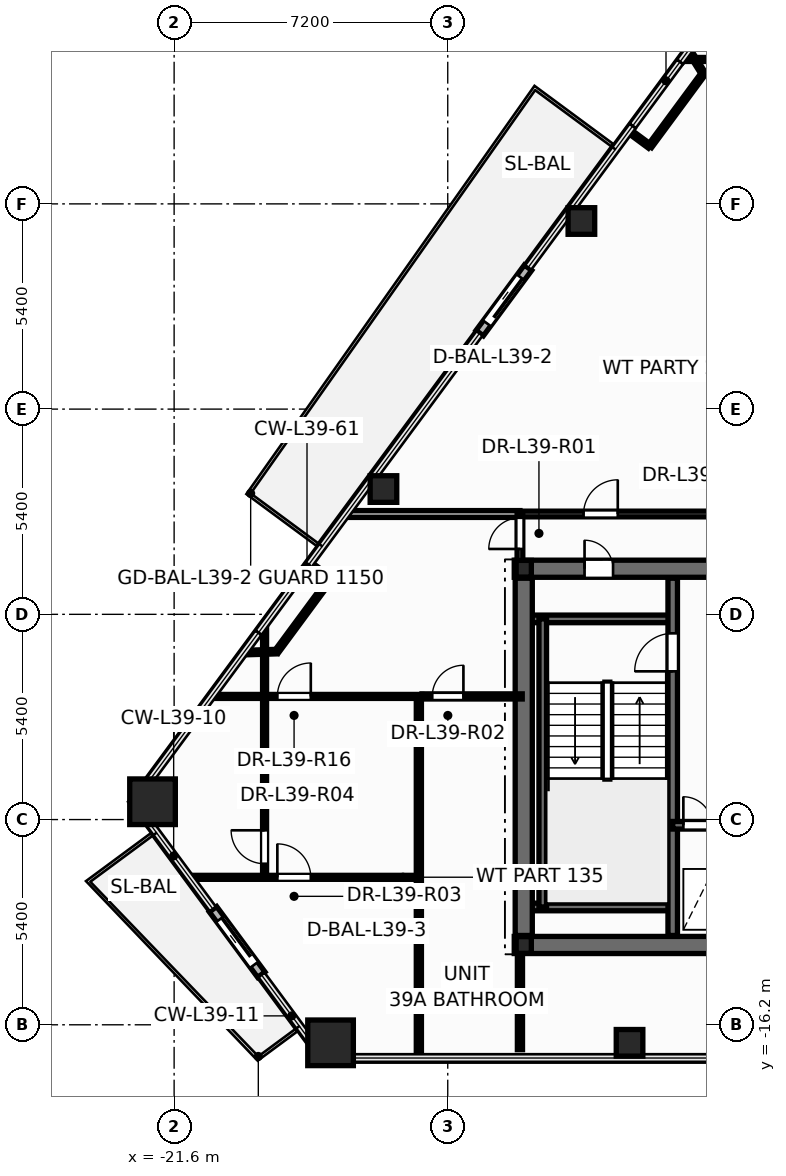
"""IFC4 building model, lengths in metres.
Left out: names, types, materials, properties, quantities, classifications, styles, units other than length and angle.
Written with IfcOpenShell. Run it as: python <this file> out.ifc"""

import sys

from ifc_helpers import new_model, si_unit, direction, frame, frame_2d, origin, origin_2d, place, context, subcontext, project, spatial, rectangle, hollow_rectangle, hollow_circle, i_section, extrude, element, fill, save


model = new_model("IFC4")
c1 = context("Model", 3, precision=1e-05, world=origin(), true_north=direction((0.0, 1.0)))
c2 = subcontext(c1, "Body", "Model", "MODEL_VIEW")
j1 = project(units=[si_unit("LENGTHUNIT", "METRE"), si_unit("PLANEANGLEUNIT", "RADIAN")], contexts=[c1])
p1 = place(None, origin())
s1 = spatial("IfcSite", under=j1, at=p1, CompositionType="ELEMENT")
p2 = place(p1, origin())
s2 = spatial("IfcBuilding", under=s1, at=p2, CompositionType="ELEMENT")
p3 = place(p2, frame((0.0, 0.0, 150.9)))
s3 = spatial("IfcBuildingStorey", under=s2, at=p3, CompositionType="ELEMENT", Elevation=150.9)
for number, where, z_axis, x_axis in (
    (1, (-22.168, -10.331, 0.0), (0.0, 0.0, 1.0), (1.0, 0.0, 0.0)),
    (2, (-17.484, -16.674, 0.0), (0.0, 0.0, 1.0), (1.0, 0.0, 0.0)),
):
    element("IfcColumn", number, at=place(p3, frame(where, z_axis=z_axis, x_axis=x_axis)), inside=s3, PredefinedType="COLUMN", context=c2, shape_type="SweptSolid", body=[
        extrude(hollow_rectangle(XDim=1.2, YDim=1.2, WallThickness=0.055, at=origin_2d()), origin(), (0.0, 0.0, 1.0), 3.6),
    ])
for number, where, z_axis, x_axis in (
    (3, (-9.616, -16.674, 0.0), (0.0, 0.0, 1.0), (1.0, 0.0, 0.0)),
    (4, (-10.883, 4.95, 0.0), (0.0, 0.0, 1.0), (1.0, 0.0, 0.0)),
    (5, (-16.092, -2.103, 0.0), (0.0, 0.0, 1.0), (1.0, 0.0, 0.0)),
):
    element("IfcColumn", number, at=place(p3, frame(where, z_axis=z_axis, x_axis=x_axis)), inside=s3, PredefinedType="COLUMN", context=c2, shape_type="SweptSolid", body=[
        extrude(hollow_circle(Radius=0.35, WallThickness=0.03, at=origin_2d()), origin(), (0.0, 0.0, 1.0), 3.6),
    ])
for number, where, z_axis, x_axis in (
    (6, (-12.4, -14.1, 0.0), (0.0, 0.0, 1.0), (1.0, 0.0, 0.0)),
    (7, (-12.4, -4.2, 0.0), (0.0, 0.0, 1.0), (1.0, 0.0, 0.0)),
):
    element("IfcColumn", number, at=place(p3, frame(where, z_axis=z_axis, x_axis=x_axis)), inside=s3, PredefinedType="COLUMN", context=c2, shape_type="SweptSolid", body=[
        extrude(i_section(OverallWidth=0.4, OverallDepth=0.44, WebThickness=0.028, FlangeThickness=0.04, at=origin_2d()), origin(), (0.0, 0.0, 1.0), 3.6),
    ])
p4 = place(p3, frame((-12.288, 3.721, -0.015), z_axis=(0.0, 0.0, 1.0), x_axis=(-0.593996463284, -0.804467651062, 0.0)))
e8 = element("IfcWall", 8, at=p4, inside=s3, PredefinedType="STANDARD", context=c2, shape_type="SweptSolid", body=[
    extrude(rectangle(XDim=2.14, YDim=0.24, at=frame_2d((1.07, 0.0))), origin(), (0.0, 0.0, 1.0), 2.807),
])
p5 = place(p4, frame((0.32, 0.0, 0.015)))
e9 = element("IfcOpeningElement", 9, at=p5, cuts=e8, PredefinedType="OPENING", context=c2, shape_type="SweptSolid", body=[
    extrude(rectangle(XDim=1.506, YDim=2.204, at=frame_2d((0.75, 1.102))), frame((0.0, 0.13, 0.0), z_axis=(0.0, -1.0, 0.0), x_axis=(1.0, 0.0, 0.0)), (0.0, 0.0, 1.0), 0.26),
])
p6 = place(p3, frame((-20.577, -13.159, -0.015), z_axis=(0.0, 0.0, 1.0), x_axis=(0.59407028248, -0.804413139794, 0.0)))
e10 = element("IfcWall", 10, at=p6, inside=s3, PredefinedType="STANDARD", context=c2, shape_type="SweptSolid", body=[
    extrude(rectangle(XDim=2.14, YDim=0.24, at=frame_2d((1.07, 0.0))), origin(), (0.0, 0.0, 1.0), 2.807),
])
p7 = place(p6, frame((0.32, 0.0, 0.015)))
e11 = element("IfcOpeningElement", 11, at=p7, cuts=e10, PredefinedType="OPENING", context=c2, shape_type="SweptSolid", body=[
    extrude(rectangle(XDim=1.506, YDim=2.204, at=frame_2d((0.75, 1.102))), frame((0.0, 0.13, 0.0), z_axis=(0.0, -1.0, 0.0), x_axis=(1.0, 0.0, 0.0)), (0.0, 0.0, 1.0), 0.26),
])
p8 = place(p3, frame((-12.65, -14.1, 0.0), z_axis=(0.0, 0.0, 1.0), x_axis=(1.0, 0.0, 0.0)))
e12 = element("IfcWall", 12, at=p8, inside=s3, PredefinedType="SHEAR", context=c2, shape_type="SweptSolid", body=[
    extrude(rectangle(XDim=25.3, YDim=0.45, at=frame_2d((12.65, 0.0))), origin(), (0.0, 0.0, 1.0), 3.6),
])
p9 = place(p3, frame((-12.65, -4.2, 0.0), z_axis=(0.0, 0.0, 1.0), x_axis=(1.0, 0.0, 0.0)))
e13 = element("IfcWall", 13, at=p9, inside=s3, PredefinedType="SHEAR", context=c2, shape_type="SweptSolid", body=[
    extrude(rectangle(XDim=25.3, YDim=0.45, at=frame_2d((12.65, 0.0))), origin(), (0.0, 0.0, 1.0), 3.6),
])
p10 = place(p9, frame((1.85, 0.0, 0.0)))
e14 = element("IfcOpeningElement", 14, at=p10, cuts=e13, PredefinedType="OPENING", context=c2, shape_type="SweptSolid", body=[
    extrude(rectangle(XDim=0.756, YDim=2.054, at=frame_2d((0.375, 1.027))), frame((0.0, 0.235, 0.0), z_axis=(0.0, -1.0, 0.0), x_axis=(1.0, 0.0, 0.0)), (0.0, 0.0, 1.0), 0.47),
])
p11 = place(p9, frame((22.65, 0.0, 0.0)))
e15 = element("IfcOpeningElement", 15, at=p11, cuts=e13, PredefinedType="OPENING", context=c2, shape_type="SweptSolid", body=[
    extrude(rectangle(XDim=0.756, YDim=2.054, at=frame_2d((0.375, 1.027))), frame((0.0, 0.235, 0.0), z_axis=(0.0, -1.0, 0.0), x_axis=(1.0, 0.0, 0.0)), (0.0, 0.0, 1.0), 0.47),
])
p12 = place(p9, frame((5.85, 0.0, 0.0)))
e16 = element("IfcOpeningElement", 16, at=p12, cuts=e13, PredefinedType="OPENING", context=c2, shape_type="SweptSolid", body=[
    extrude(rectangle(XDim=1.006, YDim=2.104, at=frame_2d((0.5, 1.052))), frame((0.0, 0.235, 0.0), z_axis=(0.0, -1.0, 0.0), x_axis=(1.0, 0.0, 0.0)), (0.0, 0.0, 1.0), 0.47),
])
p13 = place(p9, frame((10.35, 0.0, 0.0)))
e17 = element("IfcOpeningElement", 17, at=p13, cuts=e13, PredefinedType="OPENING", context=c2, shape_type="SweptSolid", body=[
    extrude(rectangle(XDim=1.406, YDim=2.154, at=frame_2d((0.7, 1.077))), frame((0.0, 0.235, 0.0), z_axis=(0.0, -1.0, 0.0), x_axis=(1.0, 0.0, 0.0)), (0.0, 0.0, 1.0), 0.47),
])
p14 = place(p9, frame((18.45, 0.0, 0.0)))
e18 = element("IfcOpeningElement", 18, at=p14, cuts=e13, PredefinedType="OPENING", context=c2, shape_type="SweptSolid", body=[
    extrude(rectangle(XDim=1.006, YDim=2.104, at=frame_2d((0.5, 1.052))), frame((0.0, 0.235, 0.0), z_axis=(0.0, -1.0, 0.0), x_axis=(1.0, 0.0, 0.0)), (0.0, 0.0, 1.0), 0.47),
])
for number, where, z_axis, x_axis in (
    (19, (-12.35, -5.52, 0.0), (0.0, 0.0, 1.0), (1.0, 0.0, 0.0)),
    (20, (-12.35, -13.1, 0.0), (0.0, 0.0, 1.0), (1.0, 0.0, 0.0)),
):
    element("IfcWall", number, at=place(p3, frame(where, z_axis=z_axis, x_axis=x_axis)), inside=s3, PredefinedType="SOLIDWALL", context=c2, shape_type="SweptSolid", body=[
        extrude(rectangle(XDim=3.87, YDim=0.2, at=frame_2d((1.935, 0.0))), origin(), (0.0, 0.0, 1.0), 3.6),
    ])
p15 = place(p3, frame((-11.9, -13.1, 0.0), z_axis=(0.0, 0.0, 1.0), x_axis=(0.0, 1.0, 0.0)))
e21 = element("IfcWall", 21, at=p15, inside=s3, PredefinedType="SOLIDWALL", context=c2, shape_type="SweptSolid", body=[
    extrude(rectangle(XDim=7.58, YDim=0.2, at=frame_2d((3.79, 0.0))), origin(), (0.0, 0.0, 1.0), 3.6),
])
p16 = place(p3, frame((-8.48, -13.85, 0.0), z_axis=(0.0, 0.0, 1.0), x_axis=(0.0, 1.0, 0.0)))
e22 = element("IfcWall", 22, at=p16, inside=s3, PredefinedType="SHEAR", context=c2, shape_type="SweptSolid", body=[
    extrude(rectangle(XDim=9.4, YDim=0.25, at=frame_2d((4.7, 0.0))), origin(), (0.0, 0.0, 1.0), 3.6),
])
p17 = place(p16, frame((6.95, 0.0, 0.0)))
e23 = element("IfcOpeningElement", 23, at=p17, cuts=e22, PredefinedType="OPENING", context=c2, shape_type="SweptSolid", body=[
    extrude(rectangle(XDim=1.006, YDim=2.104, at=frame_2d((0.5, 1.052))), frame((0.0, 0.135, 0.0), z_axis=(0.0, -1.0, 0.0), x_axis=(1.0, 0.0, 0.0)), (0.0, 0.0, 1.0), 0.27),
])
p18 = place(p3, frame((-8.48, -10.95, 0.0), z_axis=(0.0, 0.0, 1.0), x_axis=(1.0, 0.0, 0.0)))
e24 = element("IfcWall", 24, at=p18, inside=s3, PredefinedType="SOLIDWALL", context=c2, shape_type="SweptSolid", body=[
    extrude(rectangle(XDim=3.36, YDim=0.2, at=frame_2d((1.68, 0.0))), origin(), (0.0, 0.0, 1.0), 3.6),
])
p19 = place(p18, frame((0.28, 0.0, 0.0)))
e25 = element("IfcOpeningElement", 25, at=p19, cuts=e24, PredefinedType="OPENING", context=c2, shape_type="SweptSolid", body=[
    extrude(rectangle(XDim=0.756, YDim=2.054, at=frame_2d((0.375, 1.027))), frame((0.0, 0.11, 0.0), z_axis=(0.0, -1.0, 0.0), x_axis=(1.0, 0.0, 0.0)), (0.0, 0.0, 1.0), 0.22),
])
p20 = place(p18, frame((1.85, 0.0, 0.0)))
e26 = element("IfcOpeningElement", 26, at=p20, cuts=e24, PredefinedType="OPENING", context=c2, shape_type="SweptSolid", body=[
    extrude(rectangle(XDim=1.106, YDim=2.104, at=frame_2d((0.55, 1.052))), frame((0.0, 0.11, 0.0), z_axis=(0.0, -1.0, 0.0), x_axis=(1.0, 0.0, 0.0)), (0.0, 0.0, 1.0), 0.22),
])
p21 = place(p3, frame((-12.4, -13.85, 0.0), z_axis=(0.0, 0.0, 1.0), x_axis=(0.0, 1.0, 0.0)))
e27 = element("IfcWall", 27, at=p21, inside=s3, PredefinedType="SHEAR", context=c2, shape_type="SweptSolid", body=[
    extrude(rectangle(XDim=9.4, YDim=0.45, at=frame_2d((4.7, 0.0))), origin(), (0.0, 0.0, 1.0), 3.6),
])
p22 = place(p3, frame((-19.22, -12.32, 0.0), z_axis=(0.0, 0.0, 1.0), x_axis=(0.0, 1.0, 0.0)))
e28 = element("IfcWall", 28, at=p22, inside=s3, PredefinedType="PARTITIONING", context=c2, shape_type="SweptSolid", body=[
    extrude(rectangle(XDim=6.654, YDim=0.105, at=frame_2d((3.327, 0.0))), origin(), (0.0, 0.0, 1.0), 2.325),
])
p23 = place(p22, frame((0.357, 0.0, 0.0)))
e29 = element("IfcOpeningElement", 29, at=p23, cuts=e28, PredefinedType="OPENING", context=c2, shape_type="SweptSolid", body=[
    extrude(rectangle(XDim=0.886, YDim=2.104, at=frame_2d((0.44, 1.052))), frame((0.0, 0.062, 0.0), z_axis=(0.0, -1.0, 0.0), x_axis=(1.0, 0.0, 0.0)), (0.0, 0.0, 1.0), 0.125),
])
p24 = place(p3, frame((-12.5, -2.76, 0.0), z_axis=(0.0, 0.0, 1.0), x_axis=(1.0, 0.0, 0.0)))
e30 = element("IfcWall", 30, at=p24, inside=s3, PredefinedType="PARTITIONING", context=c2, shape_type="SweptSolid", body=[
    extrude(rectangle(XDim=6.478, YDim=0.15, at=frame_2d((3.239, 0.0))), origin(), (0.0, 0.0, 1.0), 2.325),
])
p25 = place(p24, frame((1.674, 0.0, 0.0)))
e31 = element("IfcOpeningElement", 31, at=p25, cuts=e30, PredefinedType="OPENING", context=c2, shape_type="SweptSolid", body=[
    extrude(rectangle(XDim=0.906, YDim=2.104, at=frame_2d((0.45, 1.052))), frame((0.0, 0.085, 0.0), z_axis=(0.0, -1.0, 0.0), x_axis=(1.0, 0.0, 0.0)), (0.0, 0.0, 1.0), 0.17),
])
p26 = place(p3, frame((-21.197, -12.32, 0.0), z_axis=(0.0, 0.0, 1.0), x_axis=(1.0, 0.0, 0.0)))
e32 = element("IfcWall", 32, at=p26, inside=s3, PredefinedType="PARTITIONING", context=c2, shape_type="SweptSolid", body=[
    extrude(rectangle(XDim=6.037, YDim=0.105, at=frame_2d((3.019, 0.0))), origin(), (0.0, 0.0, 1.0), 2.792),
])
p27 = place(p26, frame((2.313, 0.0, 0.0)))
e33 = element("IfcOpeningElement", 33, at=p27, cuts=e32, PredefinedType="OPENING", context=c2, shape_type="SweptSolid", body=[
    extrude(rectangle(XDim=0.886, YDim=2.104, at=frame_2d((0.44, 1.052))), frame((0.0, 0.062, 0.0), z_axis=(0.0, -1.0, 0.0), x_axis=(1.0, 0.0, 0.0)), (0.0, 0.0, 1.0), 0.125),
])
p28 = place(p3, frame((-20.619, -7.56, 0.0), z_axis=(0.0, 0.0, 1.0), x_axis=(1.0, 0.0, 0.0)))
e34 = element("IfcWall", 34, at=p28, inside=s3, PredefinedType="PARTITIONING", context=c2, shape_type="SweptSolid", body=[
    extrude(rectangle(XDim=5.539, YDim=0.105, at=frame_2d((2.77, 0.0))), origin(), (0.0, 0.0, 1.0), 2.325),
])
p29 = place(p28, frame((1.735, 0.0, 0.0)))
e35 = element("IfcOpeningElement", 35, at=p29, cuts=e34, PredefinedType="OPENING", context=c2, shape_type="SweptSolid", body=[
    extrude(rectangle(XDim=0.886, YDim=2.104, at=frame_2d((0.44, 1.052))), frame((0.0, 0.062, 0.0), z_axis=(0.0, -1.0, 0.0), x_axis=(1.0, 0.0, 0.0)), (0.0, 0.0, 1.0), 0.125),
])
p30 = place(p3, frame((-15.16, -17.074, 0.0), z_axis=(0.0, 0.0, 1.0), x_axis=(0.0, 1.0, 0.0)))
e36 = element("IfcWall", 36, at=p30, inside=s3, PredefinedType="PARTITIONING", context=c2, shape_type="SweptSolid", body=[
    extrude(rectangle(XDim=9.514, YDim=0.135, at=frame_2d((4.757, 0.0))), origin(), (0.0, 0.0, 1.0), 2.792),
])
p31 = place(p3, frame((-17.074, -2.76, 0.0), z_axis=(0.0, 0.0, 1.0), x_axis=(1.0, 0.0, 0.0)))
e37 = element("IfcWall", 37, at=p31, inside=s3, PredefinedType="PARTITIONING", context=c2, shape_type="SweptSolid", body=[
    extrude(rectangle(XDim=4.574, YDim=0.18, at=frame_2d((2.287, 0.0))), origin(), (0.0, 0.0, 1.0), 2.792),
])
p32 = place(p3, frame((-15.078, -7.56, 0.0), z_axis=(0.0, 0.0, 1.0), x_axis=(1.0, 0.0, 0.0)))
e38 = element("IfcWall", 38, at=p32, inside=s3, PredefinedType="PARTITIONING", context=c2, shape_type="SweptSolid", body=[
    extrude(rectangle(XDim=2.638, YDim=0.135, at=frame_2d((1.319, 0.0))), origin(), (0.0, 0.0, 1.0), 2.792),
])
p33 = place(p32, frame((0.271, 0.0, 0.0)))
e39 = element("IfcOpeningElement", 39, at=p33, cuts=e38, PredefinedType="OPENING", context=c2, shape_type="SweptSolid", body=[
    extrude(rectangle(XDim=0.826, YDim=2.104, at=frame_2d((0.41, 1.052))), frame((0.0, 0.078, 0.0), z_axis=(0.0, -1.0, 0.0), x_axis=(1.0, 0.0, 0.0)), (0.0, 0.0, 1.0), 0.155),
])
for number, where, z_axis, x_axis in (
    (40, (-7.671, 8.827, 0.0), (0.0, 0.0, 1.0), (-0.594, -0.804, 0.0)),
    (41, (-17.49, -4.468, 0.0), (0.0, 0.0, 1.0), (-0.594, -0.804, 0.0)),
):
    element("IfcWall", number, at=place(p3, frame(where, z_axis=z_axis, x_axis=x_axis)), inside=s3, PredefinedType="PARTITIONING", context=c2, shape_type="SweptSolid", body=[
        extrude(rectangle(XDim=2.378, YDim=0.12, at=frame_2d((1.189, 0.0))), origin(), (0.0, 0.0, 1.0), 3.35),
    ])
p34 = place(p3, frame((-8.12, 9.2, 0.0), z_axis=(0.0, 0.0, 1.0), x_axis=(1.0, 0.0, 0.0)))
e42 = element("IfcWall", 42, at=p34, inside=s3, PredefinedType="PARTITIONING", context=c2, shape_type="SweptSolid", body=[
    extrude(rectangle(XDim=2.098, YDim=0.105, at=frame_2d((1.049, 0.0))), origin(), (0.0, 0.0, 1.0), 2.792),
])
p35 = place(p3, frame((-12.5, -4.24, 0.0), z_axis=(0.0, 0.0, 1.0), x_axis=(0.0, 1.0, 0.0)))
e43 = element("IfcWall", 43, at=p35, inside=s3, PredefinedType="PARTITIONING", context=c2, shape_type="SweptSolid", body=[
    extrude(rectangle(XDim=1.48, YDim=0.15, at=frame_2d((0.74, 0.0))), origin(), (0.0, 0.0, 1.0), 2.325),
])
p36 = place(p35, frame((0.56, 0.0, 0.0)))
e44 = element("IfcOpeningElement", 44, at=p36, cuts=e43, PredefinedType="OPENING", context=c2, shape_type="SweptSolid", body=[
    extrude(rectangle(XDim=0.826, YDim=2.104, at=frame_2d((0.41, 1.052))), frame((0.0, 0.085, 0.0), z_axis=(0.0, -1.0, 0.0), x_axis=(1.0, 0.0, 0.0)), (0.0, 0.0, 1.0), 0.17),
])
p37 = place(p3, frame((-18.903, -6.381, 0.0), z_axis=(0.0, 0.0, 1.0), x_axis=(-0.999556038353, -0.029794734305, 0.0)))
e45 = element("IfcWall", 45, at=p37, inside=s3, PredefinedType="PARTITIONING", context=c2, shape_type="SweptSolid", body=[
    extrude(rectangle(XDim=0.852, YDim=0.12, at=frame_2d((0.426, 0.0))), origin(), (0.0, 0.0, 1.0), 2.792),
])
p38 = place(p3, frame((-8.054, 9.437, 0.0), z_axis=(0.0, 0.0, 1.0), x_axis=(0.531553111266, -0.847024964156, 0.0)))
e46 = element("IfcWall", 46, at=p38, inside=s3, PredefinedType="PARTITIONING", context=c2, shape_type="SweptSolid", body=[
    extrude(rectangle(XDim=0.72, YDim=0.12, at=frame_2d((0.36, 0.0))), origin(), (0.0, 0.0, 1.0), 2.792),
])
for number, where, z_axis, x_axis in (
    (47, (-9.084, 6.914, 0.0), (0.0, 0.0, 1.0), (-0.804, 0.594, 0.0)),
    (48, (-18.029, -4.07, 0.0), (0.0, 0.0, 1.0), (0.805, -0.594, 0.0)),
):
    element("IfcWall", number, at=place(p3, frame(where, z_axis=z_axis, x_axis=x_axis)), inside=s3, PredefinedType="PARTITIONING", context=c2, shape_type="SweptSolid", body=[
        extrude(rectangle(XDim=0.67, YDim=0.12, at=frame_2d((0.335, 0.0))), origin(), (0.0, 0.0, 1.0), 2.792),
    ])
p39 = place(p3, frame((-12.5, -14.4, 0.0), z_axis=(0.0, 0.0, 1.0), x_axis=(0.0, -1.0, 0.0)))
e49 = element("IfcWall", 49, at=p39, inside=s3, PredefinedType="PARTITIONING", context=c2, shape_type="SweptSolid", body=[
    extrude(rectangle(XDim=2.455, YDim=0.135, at=frame_2d((1.227, 0.0))), origin(), (0.0, 0.0, 1.0), 2.792),
])
p40 = place(p5, origin())
e50 = element("IfcDoor", 50, at=p40, inside=s3, OperationType="SLIDING_TO_RIGHT", PredefinedType="DOOR", context=c2, shape_type="SweptSolid", body=[
    extrude(rectangle(XDim=1.5, YDim=2.2, at=frame_2d((0.75, 1.1))), frame((0.0, 0.025, 0.0), z_axis=(0.0, -1.0, 0.0), x_axis=(1.0, 0.0, 0.0)), (0.0, 0.0, 1.0), 0.05),
])
fill(e9, e50)
p41 = place(p7, origin())
e51 = element("IfcDoor", 51, at=p41, inside=s3, OperationType="SLIDING_TO_RIGHT", PredefinedType="DOOR", context=c2, shape_type="SweptSolid", body=[
    extrude(rectangle(XDim=1.5, YDim=2.2, at=frame_2d((0.75, 1.1))), frame((0.0, 0.025, 0.0), z_axis=(0.0, -1.0, 0.0), x_axis=(1.0, 0.0, 0.0)), (0.0, 0.0, 1.0), 0.05),
])
fill(e11, e51)
p42 = place(p17, origin())
e52 = element("IfcDoor", 52, at=p42, inside=s3, OperationType="SINGLE_SWING_LEFT", PredefinedType="DOOR", context=c2, shape_type="SweptSolid", body=[
    extrude(rectangle(XDim=1.0, YDim=2.1, at=frame_2d((0.5, 1.05))), frame((0.0, 0.025, 0.0), z_axis=(0.0, -1.0, 0.0), x_axis=(1.0, 0.0, 0.0)), (0.0, 0.0, 1.0), 0.05),
])
fill(e23, e52)
p43 = place(p19, origin())
e53 = element("IfcDoor", 53, at=p43, inside=s3, OperationType="SINGLE_SWING_LEFT", PredefinedType="DOOR", context=c2, shape_type="SweptSolid", body=[
    extrude(rectangle(XDim=0.75, YDim=2.05, at=frame_2d((0.375, 1.025))), frame((0.0, 0.025, 0.0), z_axis=(0.0, -1.0, 0.0), x_axis=(1.0, 0.0, 0.0)), (0.0, 0.0, 1.0), 0.05),
])
fill(e25, e53)
p44 = place(p10, origin())
e54 = element("IfcDoor", 54, at=p44, inside=s3, OperationType="SINGLE_SWING_LEFT", PredefinedType="DOOR", context=c2, shape_type="SweptSolid", body=[
    extrude(rectangle(XDim=0.75, YDim=2.05, at=frame_2d((0.375, 1.025))), frame((0.0, 0.025, 0.0), z_axis=(0.0, -1.0, 0.0), x_axis=(1.0, 0.0, 0.0)), (0.0, 0.0, 1.0), 0.05),
])
fill(e14, e54)
p45 = place(p36, origin())
e55 = element("IfcDoor", 55, at=p45, inside=s3, OperationType="SINGLE_SWING_LEFT", PredefinedType="DOOR", context=c2, shape_type="SweptSolid", body=[
    extrude(rectangle(XDim=0.82, YDim=2.1, at=frame_2d((0.41, 1.05))), frame((0.0, 0.025, 0.0), z_axis=(0.0, -1.0, 0.0), x_axis=(1.0, 0.0, 0.0)), (0.0, 0.0, 1.0), 0.05),
])
fill(e44, e55)
p46 = place(p33, origin())
e56 = element("IfcDoor", 56, at=p46, inside=s3, OperationType="SINGLE_SWING_RIGHT", PredefinedType="DOOR", context=c2, shape_type="SweptSolid", body=[
    extrude(rectangle(XDim=0.82, YDim=2.1, at=frame_2d((0.41, 1.05))), frame((0.0, 0.025, 0.0), z_axis=(0.0, -1.0, 0.0), x_axis=(1.0, 0.0, 0.0)), (0.0, 0.0, 1.0), 0.05),
])
fill(e39, e56)
p47 = place(p27, origin())
e57 = element("IfcDoor", 57, at=p47, inside=s3, OperationType="SINGLE_SWING_LEFT", PredefinedType="DOOR", context=c2, shape_type="SweptSolid", body=[
    extrude(rectangle(XDim=0.88, YDim=2.1, at=frame_2d((0.44, 1.05))), frame((0.0, 0.025, 0.0), z_axis=(0.0, -1.0, 0.0), x_axis=(1.0, 0.0, 0.0)), (0.0, 0.0, 1.0), 0.05),
])
fill(e33, e57)
p48 = place(p23, origin())
e58 = element("IfcDoor", 58, at=p48, inside=s3, OperationType="SINGLE_SWING_RIGHT", PredefinedType="DOOR", context=c2, shape_type="SweptSolid", body=[
    extrude(rectangle(XDim=0.88, YDim=2.1, at=frame_2d((0.44, 1.05))), frame((0.0, 0.025, 0.0), z_axis=(0.0, -1.0, 0.0), x_axis=(1.0, 0.0, 0.0)), (0.0, 0.0, 1.0), 0.05),
])
fill(e29, e58)
p49 = place(p25, origin())
e59 = element("IfcDoor", 59, at=p49, inside=s3, OperationType="SINGLE_SWING_RIGHT", PredefinedType="DOOR", context=c2, shape_type="SweptSolid", body=[
    extrude(rectangle(XDim=0.9, YDim=2.1, at=frame_2d((0.45, 1.05))), frame((0.0, 0.025, 0.0), z_axis=(0.0, -1.0, 0.0), x_axis=(1.0, 0.0, 0.0)), (0.0, 0.0, 1.0), 0.05),
])
fill(e31, e59)
p50 = place(p29, origin())
e60 = element("IfcDoor", 60, at=p50, inside=s3, OperationType="SINGLE_SWING_RIGHT", PredefinedType="DOOR", context=c2, shape_type="SweptSolid", body=[
    extrude(rectangle(XDim=0.88, YDim=2.1, at=frame_2d((0.44, 1.05))), frame((0.0, 0.025, 0.0), z_axis=(0.0, -1.0, 0.0), x_axis=(1.0, 0.0, 0.0)), (0.0, 0.0, 1.0), 0.05),
])
fill(e35, e60)
save(model, sys.argv[1])
